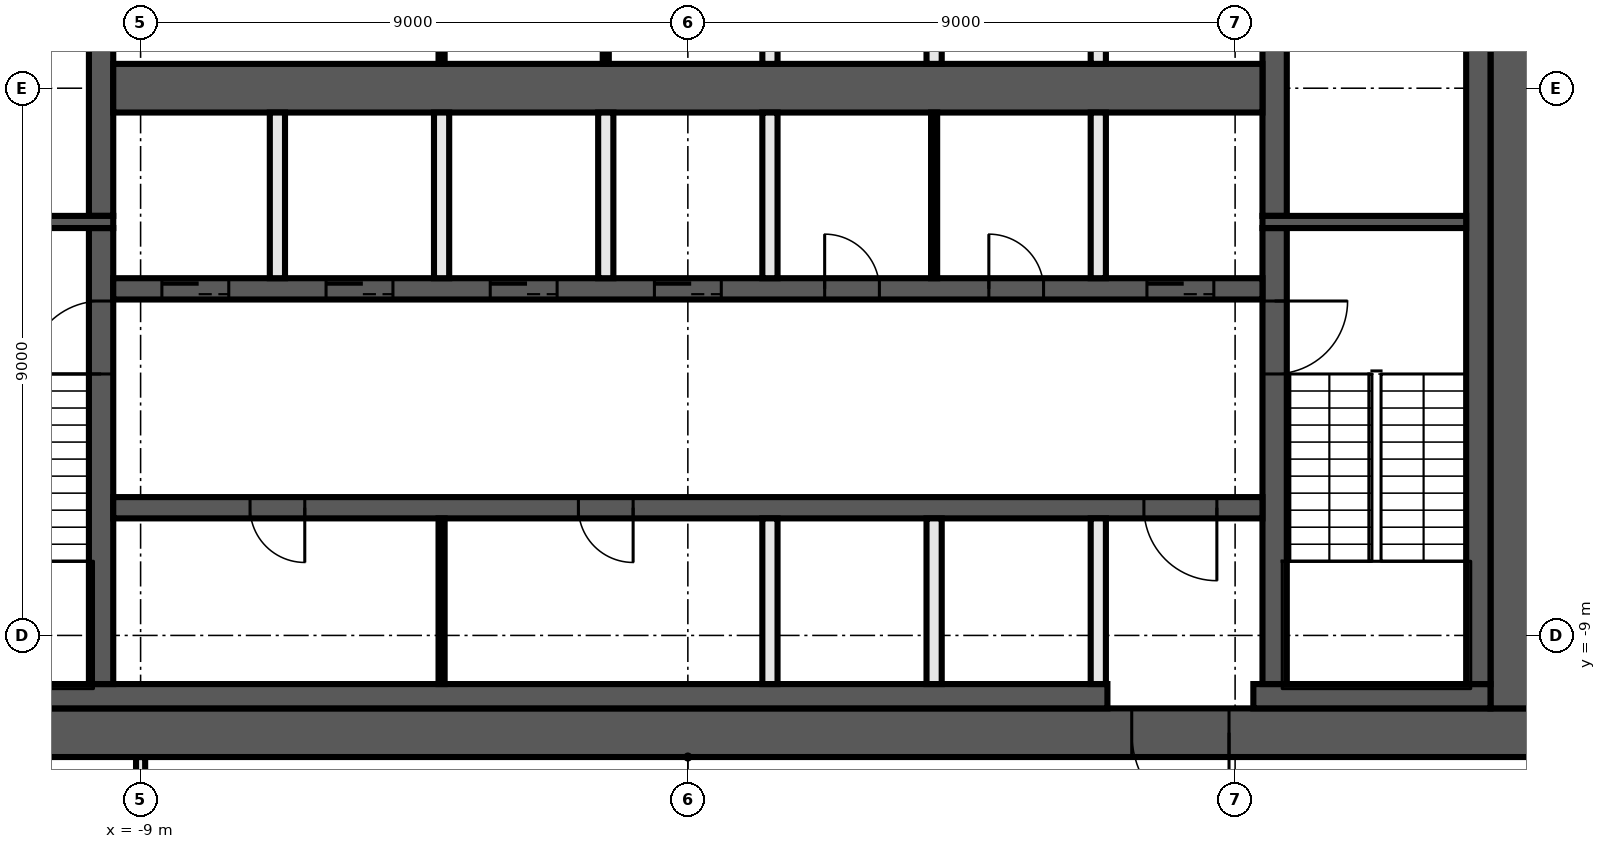
"""IFC4 building model, lengths in metres.
Left out: names, types, materials, properties, quantities, classifications, styles, units other than length and angle.
Written with IfcOpenShell. Run it as: python <this file> out.ifc"""

import sys

from ifc_helpers import new_model, si_unit, direction, frame, frame_2d, origin, place, context, subcontext, project, spatial, rectangle, extrude, element, fill, save


model = new_model("IFC4")
c1 = context("Model", 3, precision=1e-05, world=origin(), true_north=direction((0.0, 1.0)))
c2 = subcontext(c1, "Body", "Model", "MODEL_VIEW")
j1 = project(units=[si_unit("LENGTHUNIT", "METRE"), si_unit("PLANEANGLEUNIT", "RADIAN")], contexts=[c1])
p1 = place(None, origin())
s1 = spatial("IfcSite", under=j1, at=p1, CompositionType="ELEMENT")
p2 = place(p1, origin())
s2 = spatial("IfcBuilding", under=s1, at=p2, CompositionType="ELEMENT")
p3 = place(p2, frame((0.0, 0.0, 167.0)))
s3 = spatial("IfcBuildingStorey", under=s2, at=p3, CompositionType="ELEMENT", Elevation=167.0)
p4 = place(p3, frame((-9.0, -13.925, 0.0), z_axis=(0.0, 0.0, 1.0), x_axis=(0.0, 1.0, 0.0)))
e1 = element("IfcWall", 1, at=p4, inside=s3, PredefinedType="PARTITIONING", context=c2, shape_type="SweptSolid", body=[
    extrude(rectangle(XDim=2.925, YDim=0.15, at=frame_2d((1.462, 0.0))), origin(), (0.0, 0.0, 1.0), 3.82),
])
p5 = place(p3, frame((14.0, -10.6, 0.0), z_axis=(0.0, 0.0, 1.0), x_axis=(-1.0, 0.0, 0.0)))
e2 = element("IfcWall", 2, at=p5, inside=s3, PredefinedType="SHEAR", context=c2, shape_type="SweptSolid", body=[
    extrude(rectangle(XDim=28.0, YDim=0.8, at=frame_2d((14.0, 0.0))), origin(), (0.0, 0.0, 1.0), 3.82),
])
p6 = place(p5, frame((5.1, 0.0, 0.0)))
e3 = element("IfcOpeningElement", 3, at=p6, cuts=e2, PredefinedType="OPENING", context=c2, shape_type="SweptSolid", body=[
    extrude(rectangle(XDim=1.6, YDim=2.1, at=frame_2d((0.8, 1.05))), frame((0.0, 0.41, 0.0), z_axis=(0.0, -1.0, 0.0), x_axis=(1.0, 0.0, 0.0)), (0.0, 0.0, 1.0), 0.82),
])
p7 = place(p3, frame((13.6, 10.2, 0.0), z_axis=(0.0, 0.0, 1.0), x_axis=(0.0, -1.0, 0.0)))
e4 = element("IfcWall", 4, at=p7, inside=s3, PredefinedType="SHEAR", context=c2, shape_type="SweptSolid", body=[
    extrude(rectangle(XDim=20.4, YDim=0.8, at=frame_2d((10.2, 0.0))), origin(), (0.0, 0.0, 1.0), 3.82),
])
p8 = place(p3, frame((13.2, -10.0, 0.0), z_axis=(0.0, 0.0, 1.0), x_axis=(-1.0, 0.0, 0.0)))
e5 = element("IfcWall", 5, at=p8, inside=s3, PredefinedType="SHEAR", context=c2, shape_type="SweptSolid", body=[
    extrude(rectangle(XDim=3.9, YDim=0.4, at=frame_2d((1.95, 0.0))), origin(), (0.0, 0.0, 1.0), 3.82),
])
p9 = place(p3, frame((6.9, -10.0, 0.0), z_axis=(0.0, 0.0, 1.0), x_axis=(-1.0, 0.0, 0.0)))
e6 = element("IfcWall", 6, at=p9, inside=s3, PredefinedType="SHEAR", context=c2, shape_type="SweptSolid", body=[
    extrude(rectangle(XDim=20.1, YDim=0.4, at=frame_2d((10.05, 0.0))), origin(), (0.0, 0.0, 1.0), 3.82),
])
p10 = place(p3, frame((13.0, 9.8, 0.0), z_axis=(0.0, 0.0, 1.0), x_axis=(0.0, -1.0, 0.0)))
e7 = element("IfcWall", 7, at=p10, inside=s3, PredefinedType="SHEAR", context=c2, shape_type="SweptSolid", body=[
    extrude(rectangle(XDim=19.6, YDim=0.4, at=frame_2d((9.8, 0.0))), origin(), (0.0, 0.0, 1.0), 3.82),
])
p11 = place(p3, frame((9.65, -2.3, 0.0), z_axis=(0.0, 0.0, 1.0), x_axis=(0.0, -1.0, 0.0)))
e8 = element("IfcWall", 8, at=p11, inside=s3, PredefinedType="SHEAR", context=c2, shape_type="SweptSolid", body=[
    extrude(rectangle(XDim=7.5, YDim=0.4, at=frame_2d((3.75, 0.0))), origin(), (0.0, 0.0, 1.0), 3.82),
])
p12 = place(p11, frame((1.2, 0.0, 0.0)))
e9 = element("IfcOpeningElement", 9, at=p12, cuts=e8, PredefinedType="OPENING", context=c2, shape_type="SweptSolid", body=[
    extrude(rectangle(XDim=1.2, YDim=2.1, at=frame_2d((0.6, 1.05))), frame((0.0, 0.21, 0.0), z_axis=(0.0, -1.0, 0.0), x_axis=(1.0, 0.0, 0.0)), (0.0, 0.0, 1.0), 0.42),
])
p13 = place(p3, frame((9.65, 2.1, 0.0), z_axis=(0.0, 0.0, 1.0), x_axis=(0.0, -1.0, 0.0)))
e10 = element("IfcWall", 10, at=p13, inside=s3, PredefinedType="SHEAR", context=c2, shape_type="SweptSolid", body=[
    extrude(rectangle(XDim=4.2, YDim=0.4, at=frame_2d((2.1, 0.0))), origin(), (0.0, 0.0, 1.0), 3.82),
])
p14 = place(p13, frame((0.15, 0.0, 0.0)))
e11 = element("IfcOpeningElement", 11, at=p14, cuts=e10, PredefinedType="OPENING", context=c2, shape_type="SweptSolid", body=[
    extrude(rectangle(XDim=0.9, YDim=2.1, at=frame_2d((0.45, 1.05))), frame((0.0, 0.21, 0.0), z_axis=(0.0, -1.0, 0.0), x_axis=(1.0, 0.0, 0.0)), (0.0, 0.0, 1.0), 0.42),
])
p15 = place(p3, frame((-9.65, -9.8, 0.0), z_axis=(0.0, 0.0, 1.0), x_axis=(0.0, 1.0, 0.0)))
e12 = element("IfcWall", 12, at=p15, inside=s3, PredefinedType="SHEAR", context=c2, shape_type="SweptSolid", body=[
    extrude(rectangle(XDim=7.5, YDim=0.4, at=frame_2d((3.75, 0.0))), origin(), (0.0, 0.0, 1.0), 3.82),
])
p16 = place(p15, frame((5.1, 0.0, 0.0)))
e13 = element("IfcOpeningElement", 13, at=p16, cuts=e12, PredefinedType="OPENING", context=c2, shape_type="SweptSolid", body=[
    extrude(rectangle(XDim=1.2, YDim=2.1, at=frame_2d((0.6, 1.05))), frame((0.0, 0.21, 0.0), z_axis=(0.0, -1.0, 0.0), x_axis=(1.0, 0.0, 0.0)), (0.0, 0.0, 1.0), 0.42),
])
p17 = place(p3, frame((-9.65, -2.1, 0.0), z_axis=(0.0, 0.0, 1.0), x_axis=(0.0, 1.0, 0.0)))
e14 = element("IfcWall", 14, at=p17, inside=s3, PredefinedType="SHEAR", context=c2, shape_type="SweptSolid", body=[
    extrude(rectangle(XDim=4.2, YDim=0.4, at=frame_2d((2.1, 0.0))), origin(), (0.0, 0.0, 1.0), 3.82),
])
for number, where, z_axis, x_axis in (
    (15, (9.45, -2.2, 0.0), (0.0, 0.0, 1.0), (1.0, 0.0, 0.0)),
    (16, (-9.45, -2.2, 0.0), (0.0, 0.0, 1.0), (-1.0, 0.0, 0.0)),
):
    element("IfcWall", number, at=place(p3, frame(where, z_axis=z_axis, x_axis=x_axis)), inside=s3, PredefinedType="SHEAR", context=c2, shape_type="SweptSolid", body=[
        extrude(rectangle(XDim=3.35, YDim=0.2, at=frame_2d((1.675, 0.0))), origin(), (0.0, 0.0, 1.0), 3.82),
    ])
p18 = place(p3, frame((-9.45, -3.3, 0.0), z_axis=(0.0, 0.0, 1.0), x_axis=(1.0, 0.0, 0.0)))
e17 = element("IfcWall", 17, at=p18, inside=s3, PredefinedType="SHEAR", context=c2, shape_type="SweptSolid", body=[
    extrude(rectangle(XDim=18.9, YDim=0.35, at=frame_2d((9.45, 0.0))), origin(), (0.0, 0.0, 1.0), 3.82),
])
p19 = place(p18, frame((0.8, 0.0, 0.0)))
e18 = element("IfcOpeningElement", 18, at=p19, cuts=e17, PredefinedType="OPENING", context=c2, shape_type="SweptSolid", body=[
    extrude(rectangle(XDim=1.1, YDim=2.1, at=frame_2d((0.55, 1.05))), frame((0.0, 0.185, 0.0), z_axis=(0.0, -1.0, 0.0), x_axis=(1.0, 0.0, 0.0)), (0.0, 0.0, 1.0), 0.37),
])
p20 = place(p18, frame((3.5, 0.0, 0.0)))
e19 = element("IfcOpeningElement", 19, at=p20, cuts=e17, PredefinedType="OPENING", context=c2, shape_type="SweptSolid", body=[
    extrude(rectangle(XDim=1.1, YDim=2.1, at=frame_2d((0.55, 1.05))), frame((0.0, 0.185, 0.0), z_axis=(0.0, -1.0, 0.0), x_axis=(1.0, 0.0, 0.0)), (0.0, 0.0, 1.0), 0.37),
])
p21 = place(p18, frame((6.2, 0.0, 0.0)))
e20 = element("IfcOpeningElement", 20, at=p21, cuts=e17, PredefinedType="OPENING", context=c2, shape_type="SweptSolid", body=[
    extrude(rectangle(XDim=1.1, YDim=2.1, at=frame_2d((0.55, 1.05))), frame((0.0, 0.185, 0.0), z_axis=(0.0, -1.0, 0.0), x_axis=(1.0, 0.0, 0.0)), (0.0, 0.0, 1.0), 0.37),
])
p22 = place(p18, frame((8.9, 0.0, 0.0)))
e21 = element("IfcOpeningElement", 21, at=p22, cuts=e17, PredefinedType="OPENING", context=c2, shape_type="SweptSolid", body=[
    extrude(rectangle(XDim=1.1, YDim=2.1, at=frame_2d((0.55, 1.05))), frame((0.0, 0.185, 0.0), z_axis=(0.0, -1.0, 0.0), x_axis=(1.0, 0.0, 0.0)), (0.0, 0.0, 1.0), 0.37),
])
p23 = place(p18, frame((17.0, 0.0, 0.0)))
e22 = element("IfcOpeningElement", 22, at=p23, cuts=e17, PredefinedType="OPENING", context=c2, shape_type="SweptSolid", body=[
    extrude(rectangle(XDim=1.1, YDim=2.1, at=frame_2d((0.55, 1.05))), frame((0.0, 0.185, 0.0), z_axis=(0.0, -1.0, 0.0), x_axis=(1.0, 0.0, 0.0)), (0.0, 0.0, 1.0), 0.37),
])
p24 = place(p18, frame((11.7, 0.0, 0.0)))
e23 = element("IfcOpeningElement", 23, at=p24, cuts=e17, PredefinedType="OPENING", context=c2, shape_type="SweptSolid", body=[
    extrude(rectangle(XDim=0.9, YDim=2.1, at=frame_2d((0.45, 1.05))), frame((0.0, 0.185, 0.0), z_axis=(0.0, -1.0, 0.0), x_axis=(1.0, 0.0, 0.0)), (0.0, 0.0, 1.0), 0.37),
])
p25 = place(p18, frame((14.4, 0.0, 0.0)))
e24 = element("IfcOpeningElement", 24, at=p25, cuts=e17, PredefinedType="OPENING", context=c2, shape_type="SweptSolid", body=[
    extrude(rectangle(XDim=0.9, YDim=2.1, at=frame_2d((0.45, 1.05))), frame((0.0, 0.185, 0.0), z_axis=(0.0, -1.0, 0.0), x_axis=(1.0, 0.0, 0.0)), (0.0, 0.0, 1.0), 0.37),
])
p26 = place(p3, frame((9.45, -6.9, 0.0), z_axis=(0.0, 0.0, 1.0), x_axis=(-1.0, 0.0, 0.0)))
e25 = element("IfcWall", 25, at=p26, inside=s3, PredefinedType="SHEAR", context=c2, shape_type="SweptSolid", body=[
    extrude(rectangle(XDim=18.9, YDim=0.35, at=frame_2d((9.45, 0.0))), origin(), (0.0, 0.0, 1.0), 3.82),
])
p27 = place(p26, frame((0.75, 0.0, 0.0)))
e26 = element("IfcOpeningElement", 26, at=p27, cuts=e25, PredefinedType="OPENING", context=c2, shape_type="SweptSolid", body=[
    extrude(rectangle(XDim=1.2, YDim=2.1, at=frame_2d((0.6, 1.05))), frame((0.0, 0.185, 0.0), z_axis=(0.0, -1.0, 0.0), x_axis=(1.0, 0.0, 0.0)), (0.0, 0.0, 1.0), 0.37),
])
p28 = place(p26, frame((15.75, 0.0, 0.0)))
e27 = element("IfcOpeningElement", 27, at=p28, cuts=e25, PredefinedType="OPENING", context=c2, shape_type="SweptSolid", body=[
    extrude(rectangle(XDim=0.9, YDim=2.1, at=frame_2d((0.45, 1.05))), frame((0.0, 0.185, 0.0), z_axis=(0.0, -1.0, 0.0), x_axis=(1.0, 0.0, 0.0)), (0.0, 0.0, 1.0), 0.37),
])
p29 = place(p26, frame((10.35, 0.0, 0.0)))
e28 = element("IfcOpeningElement", 28, at=p29, cuts=e25, PredefinedType="OPENING", context=c2, shape_type="SweptSolid", body=[
    extrude(rectangle(XDim=0.9, YDim=2.1, at=frame_2d((0.45, 1.05))), frame((0.0, 0.185, 0.0), z_axis=(0.0, -1.0, 0.0), x_axis=(1.0, 0.0, 0.0)), (0.0, 0.0, 1.0), 0.37),
])
p30 = place(p3, frame((-9.45, 0.0, 0.0), z_axis=(0.0, 0.0, 1.0), x_axis=(1.0, 0.0, 0.0)))
e29 = element("IfcWall", 29, at=p30, inside=s3, PredefinedType="SHEAR", context=c2, shape_type="SweptSolid", body=[
    extrude(rectangle(XDim=18.9, YDim=0.8, at=frame_2d((9.45, 0.0))), origin(), (0.0, 0.0, 1.0), 3.82),
])
for number, where, z_axis, x_axis in (
    (30, (6.75, -9.8, 0.0), (0.0, 0.0, 1.0), (0.0, 1.0, 0.0)),
    (31, (6.75, -3.125, 0.0), (0.0, 0.0, 1.0), (0.0, 1.0, 0.0)),
    (32, (6.75, 0.4, 0.0), (0.0, 0.0, 1.0), (0.0, 1.0, 0.0)),
):
    element("IfcWall", number, at=place(p3, frame(where, z_axis=z_axis, x_axis=x_axis)), inside=s3, PredefinedType="SOLIDWALL", context=c2, shape_type="SweptSolid", body=[
        extrude(rectangle(XDim=2.725, YDim=0.25, at=frame_2d((1.363, 0.0))), origin(), (0.0, 0.0, 1.0), 3.82),
    ])
p31 = place(p3, frame((4.05, -3.125, 0.0), z_axis=(0.0, 0.0, 1.0), x_axis=(0.0, 1.0, 0.0)))
e33 = element("IfcWall", 33, at=p31, inside=s3, PredefinedType="PARTITIONING", context=c2, shape_type="SweptSolid", body=[
    extrude(rectangle(XDim=2.725, YDim=0.1, at=frame_2d((1.363, 0.0))), origin(), (0.0, 0.0, 1.0), 3.82),
])
for number, where, z_axis, x_axis in (
    (34, (4.05, -9.8, 0.0), (0.0, 0.0, 1.0), (0.0, 1.0, 0.0)),
    (35, (4.05, 0.4, 0.0), (0.0, 0.0, 1.0), (0.0, 1.0, 0.0)),
    (36, (1.35, -9.8, 0.0), (0.0, 0.0, 1.0), (0.0, 1.0, 0.0)),
    (37, (1.35, -3.125, 0.0), (0.0, 0.0, 1.0), (0.0, 1.0, 0.0)),
    (38, (1.35, 0.4, 0.0), (0.0, 0.0, 1.0), (0.0, 1.0, 0.0)),
):
    element("IfcWall", number, at=place(p3, frame(where, z_axis=z_axis, x_axis=x_axis)), inside=s3, PredefinedType="SOLIDWALL", context=c2, shape_type="SweptSolid", body=[
        extrude(rectangle(XDim=2.725, YDim=0.25, at=frame_2d((1.363, 0.0))), origin(), (0.0, 0.0, 1.0), 3.82),
    ])
p32 = place(p3, frame((-1.35, 0.4, 0.0), z_axis=(0.0, 0.0, 1.0), x_axis=(0.0, 1.0, 0.0)))
e39 = element("IfcWall", 39, at=p32, inside=s3, PredefinedType="PARTITIONING", context=c2, shape_type="SweptSolid", body=[
    extrude(rectangle(XDim=2.725, YDim=0.1, at=frame_2d((1.363, 0.0))), origin(), (0.0, 0.0, 1.0), 3.82),
])
p33 = place(p3, frame((-1.35, -3.125, 0.0), z_axis=(0.0, 0.0, 1.0), x_axis=(0.0, 1.0, 0.0)))
e40 = element("IfcWall", 40, at=p33, inside=s3, PredefinedType="SOLIDWALL", context=c2, shape_type="SweptSolid", body=[
    extrude(rectangle(XDim=2.725, YDim=0.25, at=frame_2d((1.363, 0.0))), origin(), (0.0, 0.0, 1.0), 3.82),
])
for number, where, z_axis, x_axis in (
    (41, (-4.05, -9.8, 0.0), (0.0, 0.0, 1.0), (0.0, 1.0, 0.0)),
    (42, (-4.05, 0.4, 0.0), (0.0, 0.0, 1.0), (0.0, 1.0, 0.0)),
):
    element("IfcWall", number, at=place(p3, frame(where, z_axis=z_axis, x_axis=x_axis)), inside=s3, PredefinedType="PARTITIONING", context=c2, shape_type="SweptSolid", body=[
        extrude(rectangle(XDim=2.725, YDim=0.1, at=frame_2d((1.363, 0.0))), origin(), (0.0, 0.0, 1.0), 3.82),
    ])
for number, where, z_axis, x_axis in (
    (43, (-4.05, -3.125, 0.0), (0.0, 0.0, 1.0), (0.0, 1.0, 0.0)),
    (44, (-6.75, -3.125, 0.0), (0.0, 0.0, 1.0), (0.0, 1.0, 0.0)),
):
    element("IfcWall", number, at=place(p3, frame(where, z_axis=z_axis, x_axis=x_axis)), inside=s3, PredefinedType="SOLIDWALL", context=c2, shape_type="SweptSolid", body=[
        extrude(rectangle(XDim=2.725, YDim=0.25, at=frame_2d((1.363, 0.0))), origin(), (0.0, 0.0, 1.0), 3.82),
    ])
p34 = place(p19, origin())
e45 = element("IfcDoor", 45, at=p34, inside=s3, OperationType="DOUBLE_DOOR_SLIDING", PredefinedType="DOOR", context=c2, shape_type="SweptSolid", body=[
    extrude(rectangle(XDim=1.1, YDim=2.1, at=frame_2d((0.55, 1.05))), frame((0.0, 0.025, 0.0), z_axis=(0.0, -1.0, 0.0), x_axis=(1.0, 0.0, 0.0)), (0.0, 0.0, 1.0), 0.05),
])
fill(e18, e45)
p35 = place(p20, origin())
e46 = element("IfcDoor", 46, at=p35, inside=s3, OperationType="DOUBLE_DOOR_SLIDING", PredefinedType="DOOR", context=c2, shape_type="SweptSolid", body=[
    extrude(rectangle(XDim=1.1, YDim=2.1, at=frame_2d((0.55, 1.05))), frame((0.0, 0.025, 0.0), z_axis=(0.0, -1.0, 0.0), x_axis=(1.0, 0.0, 0.0)), (0.0, 0.0, 1.0), 0.05),
])
fill(e19, e46)
p36 = place(p21, origin())
e47 = element("IfcDoor", 47, at=p36, inside=s3, OperationType="DOUBLE_DOOR_SLIDING", PredefinedType="DOOR", context=c2, shape_type="SweptSolid", body=[
    extrude(rectangle(XDim=1.1, YDim=2.1, at=frame_2d((0.55, 1.05))), frame((0.0, 0.025, 0.0), z_axis=(0.0, -1.0, 0.0), x_axis=(1.0, 0.0, 0.0)), (0.0, 0.0, 1.0), 0.05),
])
fill(e20, e47)
p37 = place(p22, origin())
e48 = element("IfcDoor", 48, at=p37, inside=s3, OperationType="DOUBLE_DOOR_SLIDING", PredefinedType="DOOR", context=c2, shape_type="SweptSolid", body=[
    extrude(rectangle(XDim=1.1, YDim=2.1, at=frame_2d((0.55, 1.05))), frame((0.0, 0.025, 0.0), z_axis=(0.0, -1.0, 0.0), x_axis=(1.0, 0.0, 0.0)), (0.0, 0.0, 1.0), 0.05),
])
fill(e21, e48)
p38 = place(p23, origin())
e49 = element("IfcDoor", 49, at=p38, inside=s3, OperationType="DOUBLE_DOOR_SLIDING", PredefinedType="DOOR", context=c2, shape_type="SweptSolid", body=[
    extrude(rectangle(XDim=1.1, YDim=2.1, at=frame_2d((0.55, 1.05))), frame((0.0, 0.025, 0.0), z_axis=(0.0, -1.0, 0.0), x_axis=(1.0, 0.0, 0.0)), (0.0, 0.0, 1.0), 0.05),
])
fill(e22, e49)
p39 = place(p6, origin())
e50 = element("IfcDoor", 50, at=p39, inside=s3, OperationType="DOUBLE_DOOR_SINGLE_SWING", PredefinedType="DOOR", context=c2, shape_type="SweptSolid", body=[
    extrude(rectangle(XDim=1.6, YDim=2.1, at=frame_2d((0.8, 1.05))), frame((0.0, 0.025, 0.0), z_axis=(0.0, -1.0, 0.0), x_axis=(1.0, 0.0, 0.0)), (0.0, 0.0, 1.0), 0.05),
])
fill(e3, e50)
p40 = place(p27, origin())
e51 = element("IfcDoor", 51, at=p40, inside=s3, OperationType="SINGLE_SWING_LEFT", PredefinedType="DOOR", context=c2, shape_type="SweptSolid", body=[
    extrude(rectangle(XDim=1.2, YDim=2.1, at=frame_2d((0.6, 1.05))), frame((0.0, 0.025, 0.0), z_axis=(0.0, -1.0, 0.0), x_axis=(1.0, 0.0, 0.0)), (0.0, 0.0, 1.0), 0.05),
])
fill(e26, e51)
p41 = place(p24, origin())
e52 = element("IfcDoor", 52, at=p41, inside=s3, OperationType="SINGLE_SWING_RIGHT", PredefinedType="DOOR", context=c2, shape_type="SweptSolid", body=[
    extrude(rectangle(XDim=0.9, YDim=2.1, at=frame_2d((0.45, 1.05))), frame((0.0, 0.025, 0.0), z_axis=(0.0, -1.0, 0.0), x_axis=(1.0, 0.0, 0.0)), (0.0, 0.0, 1.0), 0.05),
])
fill(e23, e52)
p42 = place(p25, origin())
e53 = element("IfcDoor", 53, at=p42, inside=s3, OperationType="SINGLE_SWING_LEFT", PredefinedType="DOOR", context=c2, shape_type="SweptSolid", body=[
    extrude(rectangle(XDim=0.9, YDim=2.1, at=frame_2d((0.45, 1.05))), frame((0.0, 0.025, 0.0), z_axis=(0.0, -1.0, 0.0), x_axis=(1.0, 0.0, 0.0)), (0.0, 0.0, 1.0), 0.05),
])
fill(e24, e53)
p43 = place(p28, origin())
e54 = element("IfcDoor", 54, at=p43, inside=s3, OperationType="SINGLE_SWING_RIGHT", PredefinedType="DOOR", context=c2, shape_type="SweptSolid", body=[
    extrude(rectangle(XDim=0.9, YDim=2.1, at=frame_2d((0.45, 1.05))), frame((0.0, 0.025, 0.0), z_axis=(0.0, -1.0, 0.0), x_axis=(1.0, 0.0, 0.0)), (0.0, 0.0, 1.0), 0.05),
])
fill(e27, e54)
p44 = place(p29, origin())
e55 = element("IfcDoor", 55, at=p44, inside=s3, OperationType="SINGLE_SWING_LEFT", PredefinedType="DOOR", context=c2, shape_type="SweptSolid", body=[
    extrude(rectangle(XDim=0.9, YDim=2.1, at=frame_2d((0.45, 1.05))), frame((0.0, 0.025, 0.0), z_axis=(0.0, -1.0, 0.0), x_axis=(1.0, 0.0, 0.0)), (0.0, 0.0, 1.0), 0.05),
])
fill(e28, e55)
p45 = place(p12, origin())
e56 = element("IfcDoor", 56, at=p45, inside=s3, OperationType="SINGLE_SWING_RIGHT", PredefinedType="DOOR", context=c2, shape_type="SweptSolid", body=[
    extrude(rectangle(XDim=1.2, YDim=2.1, at=frame_2d((0.6, 1.05))), frame((0.0, 0.025, 0.0), z_axis=(0.0, -1.0, 0.0), x_axis=(1.0, 0.0, 0.0)), (0.0, 0.0, 1.0), 0.05),
])
fill(e9, e56)
p46 = place(p16, origin())
e57 = element("IfcDoor", 57, at=p46, inside=s3, OperationType="SINGLE_SWING_LEFT", PredefinedType="DOOR", context=c2, shape_type="SweptSolid", body=[
    extrude(rectangle(XDim=1.2, YDim=2.1, at=frame_2d((0.6, 1.05))), frame((0.0, 0.025, 0.0), z_axis=(0.0, -1.0, 0.0), x_axis=(1.0, 0.0, 0.0)), (0.0, 0.0, 1.0), 0.05),
])
fill(e13, e57)
save(model, sys.argv[1])
